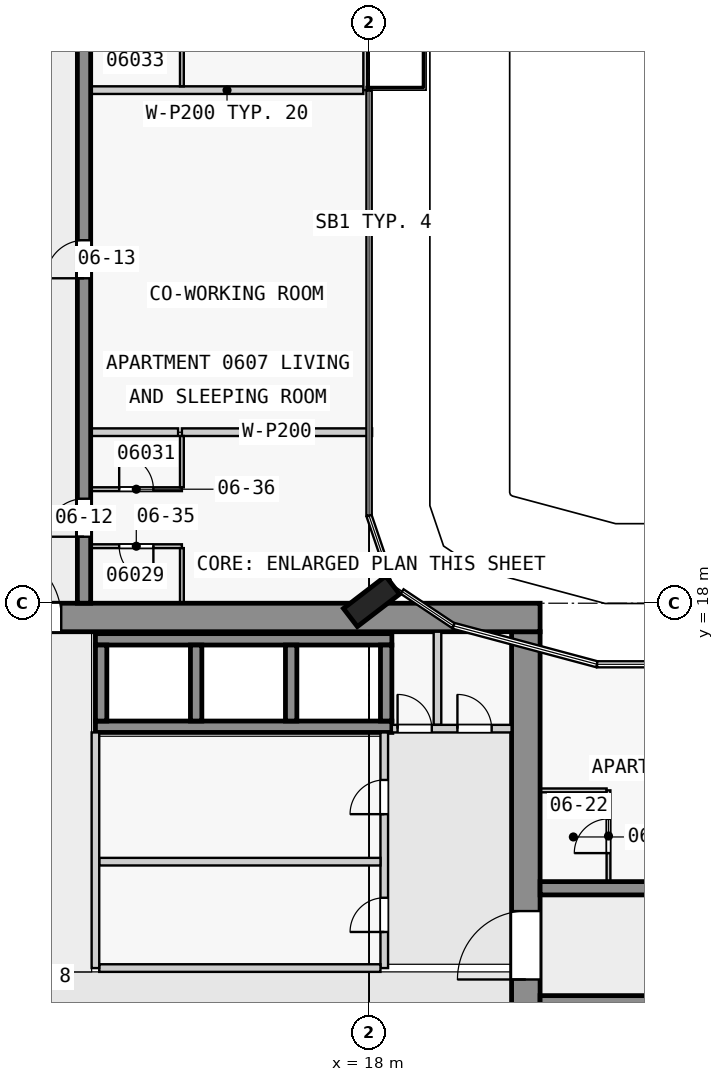
"""IFC4 building model, lengths in metres.
Left out: names, types, materials, properties, quantities, classifications, styles, units other than length and angle.
Written with IfcOpenShell. Run it as: python <this file> out.ifc"""

import sys

from ifc_helpers import new_model, si_unit, direction, frame, frame_2d, origin, origin_2d, place, context, subcontext, project, spatial, rectangle, hollow_rectangle, extrude, element, fill, save


model = new_model("IFC4")
c1 = context("Model", 3, precision=1e-05, world=origin(), true_north=direction((0.0, 1.0)))
c2 = subcontext(c1, "Body", "Model", "MODEL_VIEW")
j1 = project(units=[si_unit("LENGTHUNIT", "METRE"), si_unit("PLANEANGLEUNIT", "RADIAN")], contexts=[c1])
p1 = place(None, origin())
s1 = spatial("IfcSite", under=j1, at=p1, CompositionType="ELEMENT")
p2 = place(p1, origin())
s2 = spatial("IfcBuilding", under=s1, at=p2, CompositionType="ELEMENT")
p3 = place(p2, frame((0.0, 0.0, 30.3)))
s3 = spatial("IfcBuildingStorey", under=s2, at=p3, CompositionType="ELEMENT", Elevation=30.3)
p4 = place(p3, frame((18.065, 18.05, 0.0), z_axis=(0.0, 0.0, 1.0), x_axis=(-0.608810846443, 0.793315418515, 0.0)))
e1 = element("IfcColumn", 1, at=p4, inside=s3, PredefinedType="COLUMN", context=c2, shape_type="SweptSolid", body=[
    extrude(rectangle(XDim=0.6, YDim=1.4, at=origin_2d()), origin(), (0.0, 0.0, 1.0), 3.5),
])
p5 = place(p3, frame((1.55, 17.625, 0.0), z_axis=(0.0, 0.0, 1.0), x_axis=(1.0, 0.0, 0.0)))
e2 = element("IfcWall", 2, at=p5, inside=s3, PredefinedType="SHEAR", context=c2, shape_type="SweptSolid", body=[
    extrude(rectangle(XDim=20.95, YDim=0.75, at=frame_2d((10.475, 0.0))), origin(), (0.0, 0.0, 1.0), 3.25),
])
p6 = place(p5, frame((6.55, 0.0, 0.0)))
e3 = element("IfcOpeningElement", 3, at=p6, cuts=e2, PredefinedType="OPENING", context=c2, shape_type="SweptSolid", body=[
    extrude(rectangle(XDim=1.8, YDim=2.1, at=frame_2d((0.9, 1.05))), frame((0.0, 0.385, 0.0), z_axis=(0.0, -1.0, 0.0), x_axis=(1.0, 0.0, 0.0)), (0.0, 0.0, 1.0), 0.77),
])
p7 = place(p3, frame((22.125, 2.5, 0.0), z_axis=(0.0, 0.0, 1.0), x_axis=(0.0, 1.0, 0.0)))
e4 = element("IfcWall", 4, at=p7, inside=s3, PredefinedType="SHEAR", context=c2, shape_type="SweptSolid", body=[
    extrude(rectangle(XDim=14.75, YDim=0.75, at=frame_2d((7.375, 0.0))), origin(), (0.0, 0.0, 1.0), 3.25),
])
p8 = place(p7, frame((5.6, 0.0, 0.0)))
e5 = element("IfcOpeningElement", 5, at=p8, cuts=e4, PredefinedType="OPENING", context=c2, shape_type="SweptSolid", body=[
    extrude(rectangle(XDim=1.8, YDim=2.1, at=frame_2d((0.9, 1.05))), frame((0.0, 0.385, 0.0), z_axis=(0.0, -1.0, 0.0), x_axis=(1.0, 0.0, 0.0)), (0.0, 0.0, 1.0), 0.77),
])
for number, where, z_axis, x_axis in (
    (6, (10.8, 17.05, 0.0), (0.0, 0.0, 1.0), (1.0, 0.0, 0.0)),
    (7, (10.8, 14.75, 0.0), (0.0, 0.0, 1.0), (1.0, 0.0, 0.0)),
):
    element("IfcWall", number, at=place(p3, frame(where, z_axis=z_axis, x_axis=x_axis)), inside=s3, PredefinedType="SHEAR", context=c2, shape_type="SweptSolid", body=[
        extrude(rectangle(XDim=7.8, YDim=0.3, at=frame_2d((3.9, 0.0))), origin(), (0.0, 0.0, 1.0), 3.25),
    ])
for number, where, z_axis, x_axis in (
    (8, (10.95, 14.9, 0.0), (0.0, 0.0, 1.0), (0.0, 1.0, 0.0)),
    (9, (13.45, 14.9, 0.0), (0.0, 0.0, 1.0), (0.0, 1.0, 0.0)),
    (10, (15.95, 14.9, 0.0), (0.0, 0.0, 1.0), (0.0, 1.0, 0.0)),
    (11, (18.45, 14.9, 0.0), (0.0, 0.0, 1.0), (0.0, 1.0, 0.0)),
):
    element("IfcWall", number, at=place(p3, frame(where, z_axis=z_axis, x_axis=x_axis)), inside=s3, PredefinedType="SHEAR", context=c2, shape_type="SweptSolid", body=[
        extrude(rectangle(XDim=2.0, YDim=0.3, at=frame_2d((1.0, 0.0))), origin(), (0.0, 0.0, 1.0), 3.25),
    ])
p9 = place(p3, frame((22.5, 7.5, 0.0), z_axis=(0.0, 0.0, 1.0), x_axis=(1.0, 0.0, 0.0)))
e12 = element("IfcWall", 12, at=p9, inside=s3, PredefinedType="SHEAR", context=c2, shape_type="SweptSolid", body=[
    extrude(rectangle(XDim=22.5, YDim=0.35, at=frame_2d((11.25, 0.0))), origin(), (0.0, 0.0, 1.0), 3.25),
])
p10 = place(p9, frame((4.05, 0.0, 0.0)))
e13 = element("IfcOpeningElement", 13, at=p10, cuts=e12, PredefinedType="OPENING", context=c2, shape_type="SweptSolid", body=[
    extrude(rectangle(XDim=1.0, YDim=2.1, at=frame_2d((0.5, 1.05))), frame((0.0, 0.185, 0.0), z_axis=(0.0, -1.0, 0.0), x_axis=(1.0, 0.0, 0.0)), (0.0, 0.0, 1.0), 0.37),
])
p11 = place(p9, frame((10.75, 0.0, 0.0)))
e14 = element("IfcOpeningElement", 14, at=p11, cuts=e12, PredefinedType="OPENING", context=c2, shape_type="SweptSolid", body=[
    extrude(rectangle(XDim=1.0, YDim=2.1, at=frame_2d((0.5, 1.05))), frame((0.0, 0.185, 0.0), z_axis=(0.0, -1.0, 0.0), x_axis=(1.0, 0.0, 0.0)), (0.0, 0.0, 1.0), 0.37),
])
p12 = place(p9, frame((15.25, 0.0, 0.0)))
e15 = element("IfcOpeningElement", 15, at=p12, cuts=e12, PredefinedType="OPENING", context=c2, shape_type="SweptSolid", body=[
    extrude(rectangle(XDim=1.0, YDim=2.1, at=frame_2d((0.5, 1.05))), frame((0.0, 0.185, 0.0), z_axis=(0.0, -1.0, 0.0), x_axis=(1.0, 0.0, 0.0)), (0.0, 0.0, 1.0), 0.37),
])
p13 = place(p9, frame((18.75, 0.0, 0.0)))
e16 = element("IfcOpeningElement", 16, at=p13, cuts=e12, PredefinedType="OPENING", context=c2, shape_type="SweptSolid", body=[
    extrude(rectangle(XDim=0.9, YDim=2.1, at=frame_2d((0.45, 1.05))), frame((0.0, 0.185, 0.0), z_axis=(0.0, -1.0, 0.0), x_axis=(1.0, 0.0, 0.0)), (0.0, 0.0, 1.0), 0.37),
])
p14 = place(p9, frame((20.95, 0.0, 0.0)))
e17 = element("IfcOpeningElement", 17, at=p14, cuts=e12, PredefinedType="OPENING", context=c2, shape_type="SweptSolid", body=[
    extrude(rectangle(XDim=1.0, YDim=2.1, at=frame_2d((0.5, 1.05))), frame((0.0, 0.185, 0.0), z_axis=(0.0, -1.0, 0.0), x_axis=(1.0, 0.0, 0.0)), (0.0, 0.0, 1.0), 0.37),
])
p15 = place(p3, frame((22.5, 10.5, 0.0), z_axis=(0.0, 0.0, 1.0), x_axis=(1.0, 0.0, 0.0)))
e18 = element("IfcWall", 18, at=p15, inside=s3, PredefinedType="SHEAR", context=c2, shape_type="SweptSolid", body=[
    extrude(rectangle(XDim=22.5, YDim=0.35, at=frame_2d((11.25, 0.0))), origin(), (0.0, 0.0, 1.0), 3.25),
])
p16 = place(p15, frame((6.05, 0.0, 0.0)))
e19 = element("IfcOpeningElement", 19, at=p16, cuts=e18, PredefinedType="OPENING", context=c2, shape_type="SweptSolid", body=[
    extrude(rectangle(XDim=1.0, YDim=2.1, at=frame_2d((0.5, 1.05))), frame((0.0, 0.185, 0.0), z_axis=(0.0, -1.0, 0.0), x_axis=(1.0, 0.0, 0.0)), (0.0, 0.0, 1.0), 0.37),
])
p17 = place(p15, frame((15.25, 0.0, 0.0)))
e20 = element("IfcOpeningElement", 20, at=p17, cuts=e18, PredefinedType="OPENING", context=c2, shape_type="SweptSolid", body=[
    extrude(rectangle(XDim=1.0, YDim=2.1, at=frame_2d((0.5, 1.05))), frame((0.0, 0.185, 0.0), z_axis=(0.0, -1.0, 0.0), x_axis=(1.0, 0.0, 0.0)), (0.0, 0.0, 1.0), 0.37),
])
p18 = place(p15, frame((19.75, 0.0, 0.0)))
e21 = element("IfcOpeningElement", 21, at=p18, cuts=e18, PredefinedType="OPENING", context=c2, shape_type="SweptSolid", body=[
    extrude(rectangle(XDim=1.0, YDim=2.1, at=frame_2d((0.5, 1.05))), frame((0.0, 0.185, 0.0), z_axis=(0.0, -1.0, 0.0), x_axis=(1.0, 0.0, 0.0)), (0.0, 0.0, 1.0), 0.37),
])
p19 = place(p3, frame((10.5, 18.0, 0.0), z_axis=(0.0, 0.0, 1.0), x_axis=(0.0, 1.0, 0.0)))
e22 = element("IfcWall", 22, at=p19, inside=s3, PredefinedType="SHEAR", context=c2, shape_type="SweptSolid", body=[
    extrude(rectangle(XDim=27.0, YDim=0.35, at=frame_2d((13.5, 0.0))), origin(), (0.0, 0.0, 1.0), 3.25),
])
p20 = place(p19, frame((1.75, 0.0, 0.0)))
e23 = element("IfcOpeningElement", 23, at=p20, cuts=e22, PredefinedType="OPENING", context=c2, shape_type="SweptSolid", body=[
    extrude(rectangle(XDim=1.0, YDim=2.1, at=frame_2d((0.5, 1.05))), frame((0.0, 0.185, 0.0), z_axis=(0.0, -1.0, 0.0), x_axis=(1.0, 0.0, 0.0)), (0.0, 0.0, 1.0), 0.37),
])
p21 = place(p19, frame((8.55, 0.0, 0.0)))
e24 = element("IfcOpeningElement", 24, at=p21, cuts=e22, PredefinedType="OPENING", context=c2, shape_type="SweptSolid", body=[
    extrude(rectangle(XDim=1.0, YDim=2.1, at=frame_2d((0.5, 1.05))), frame((0.0, 0.185, 0.0), z_axis=(0.0, -1.0, 0.0), x_axis=(1.0, 0.0, 0.0)), (0.0, 0.0, 1.0), 0.37),
])
p22 = place(p19, frame((15.25, 0.0, 0.0)))
e25 = element("IfcOpeningElement", 25, at=p22, cuts=e22, PredefinedType="OPENING", context=c2, shape_type="SweptSolid", body=[
    extrude(rectangle(XDim=1.0, YDim=2.1, at=frame_2d((0.5, 1.05))), frame((0.0, 0.185, 0.0), z_axis=(0.0, -1.0, 0.0), x_axis=(1.0, 0.0, 0.0)), (0.0, 0.0, 1.0), 0.37),
])
p23 = place(p19, frame((19.75, 0.0, 0.0)))
e26 = element("IfcOpeningElement", 26, at=p23, cuts=e22, PredefinedType="OPENING", context=c2, shape_type="SweptSolid", body=[
    extrude(rectangle(XDim=1.0, YDim=2.1, at=frame_2d((0.5, 1.05))), frame((0.0, 0.185, 0.0), z_axis=(0.0, -1.0, 0.0), x_axis=(1.0, 0.0, 0.0)), (0.0, 0.0, 1.0), 0.37),
])
p24 = place(p19, frame((23.25, 0.0, 0.0)))
e27 = element("IfcOpeningElement", 27, at=p24, cuts=e22, PredefinedType="OPENING", context=c2, shape_type="SweptSolid", body=[
    extrude(rectangle(XDim=0.9, YDim=2.1, at=frame_2d((0.45, 1.05))), frame((0.0, 0.185, 0.0), z_axis=(0.0, -1.0, 0.0), x_axis=(1.0, 0.0, 0.0)), (0.0, 0.0, 1.0), 0.37),
])
p25 = place(p19, frame((25.45, 0.0, 0.0)))
e28 = element("IfcOpeningElement", 28, at=p25, cuts=e22, PredefinedType="OPENING", context=c2, shape_type="SweptSolid", body=[
    extrude(rectangle(XDim=1.0, YDim=2.1, at=frame_2d((0.5, 1.05))), frame((0.0, 0.185, 0.0), z_axis=(0.0, -1.0, 0.0), x_axis=(1.0, 0.0, 0.0)), (0.0, 0.0, 1.0), 0.37),
])
p26 = place(p3, frame((17.9, 36.0, 0.0), z_axis=(0.0, 0.0, 1.0), x_axis=(0.0, -1.0, 0.0)))
e29 = element("IfcWall", 29, at=p26, inside=s3, PredefinedType="STANDARD", context=c2, shape_type="SweptSolid", body=[
    extrude(rectangle(XDim=4.5, YDim=0.1, at=frame_2d((2.25, 0.0))), origin(), (0.0, 0.0, 1.0), 3.25),
])
p27 = place(p26, frame((1.05, 0.0, 0.0)))
e30 = element("IfcOpeningElement", 30, at=p27, cuts=e29, PredefinedType="OPENING", context=c2, shape_type="SweptSolid", body=[
    extrude(rectangle(XDim=2.4, YDim=2.4, at=frame_2d((1.2, 1.2))), frame((0.0, 0.06, 0.0), z_axis=(0.0, -1.0, 0.0), x_axis=(1.0, 0.0, 0.0)), (0.0, 0.0, 1.0), 0.12),
])
p28 = place(p3, frame((10.8, 8.4, 0.0), z_axis=(0.0, 0.0, 1.0), x_axis=(0.0, 1.0, 0.0)))
e31 = element("IfcWall", 31, at=p28, inside=s3, PredefinedType="PARTITIONING", context=c2, shape_type="SweptSolid", body=[
    extrude(rectangle(XDim=6.2, YDim=0.2, at=frame_2d((3.1, 0.0))), origin(), (0.0, 0.0, 1.0), 3.25),
])
p29 = place(p3, frame((10.9, 8.4, 0.0), z_axis=(0.0, 0.0, 1.0), x_axis=(1.0, 0.0, 0.0)))
e32 = element("IfcWall", 32, at=p29, inside=s3, PredefinedType="PARTITIONING", context=c2, shape_type="SweptSolid", body=[
    extrude(rectangle(XDim=7.4, YDim=0.2, at=frame_2d((3.7, 0.0))), origin(), (0.0, 0.0, 1.0), 3.25),
])
p30 = place(p3, frame((18.4, 8.4, 0.0), z_axis=(0.0, 0.0, 1.0), x_axis=(0.0, 1.0, 0.0)))
e33 = element("IfcWall", 33, at=p30, inside=s3, PredefinedType="PARTITIONING", context=c2, shape_type="SweptSolid", body=[
    extrude(rectangle(XDim=6.2, YDim=0.2, at=frame_2d((3.1, 0.0))), origin(), (0.0, 0.0, 1.0), 3.25),
])
p31 = place(p30, frame((0.95, 0.0, 0.0)))
e34 = element("IfcOpeningElement", 34, at=p31, cuts=e33, PredefinedType="OPENING", context=c2, shape_type="SweptSolid", body=[
    extrude(rectangle(XDim=0.9, YDim=2.1, at=frame_2d((0.45, 1.05))), frame((0.0, 0.11, 0.0), z_axis=(0.0, -1.0, 0.0), x_axis=(1.0, 0.0, 0.0)), (0.0, 0.0, 1.0), 0.22),
])
p32 = place(p30, frame((4.05, 0.0, 0.0)))
e35 = element("IfcOpeningElement", 35, at=p32, cuts=e33, PredefinedType="OPENING", context=c2, shape_type="SweptSolid", body=[
    extrude(rectangle(XDim=0.9, YDim=2.1, at=frame_2d((0.45, 1.05))), frame((0.0, 0.11, 0.0), z_axis=(0.0, -1.0, 0.0), x_axis=(1.0, 0.0, 0.0)), (0.0, 0.0, 1.0), 0.22),
])
p33 = place(p3, frame((10.9, 11.2, 0.0), z_axis=(0.0, 0.0, 1.0), x_axis=(1.0, 0.0, 0.0)))
e36 = element("IfcWall", 36, at=p33, inside=s3, PredefinedType="PARTITIONING", context=c2, shape_type="SweptSolid", body=[
    extrude(rectangle(XDim=7.4, YDim=0.2, at=frame_2d((3.7, 0.0))), origin(), (0.0, 0.0, 1.0), 3.25),
])
p34 = place(p3, frame((18.6, 14.7, 0.0), z_axis=(0.0, 0.0, 1.0), x_axis=(1.0, 0.0, 0.0)))
e37 = element("IfcWall", 37, at=p34, inside=s3, PredefinedType="PARTITIONING", context=c2, shape_type="SweptSolid", body=[
    extrude(rectangle(XDim=3.15, YDim=0.2, at=frame_2d((1.575, 0.0))), origin(), (0.0, 0.0, 1.0), 3.25),
])
p35 = place(p34, frame((0.15, 0.0, 0.0)))
e38 = element("IfcOpeningElement", 38, at=p35, cuts=e37, PredefinedType="OPENING", context=c2, shape_type="SweptSolid", body=[
    extrude(rectangle(XDim=0.9, YDim=2.1, at=frame_2d((0.45, 1.05))), frame((0.0, 0.11, 0.0), z_axis=(0.0, -1.0, 0.0), x_axis=(1.0, 0.0, 0.0)), (0.0, 0.0, 1.0), 0.22),
])
p36 = place(p34, frame((1.725, 0.0, 0.0)))
e39 = element("IfcOpeningElement", 39, at=p36, cuts=e37, PredefinedType="OPENING", context=c2, shape_type="SweptSolid", body=[
    extrude(rectangle(XDim=0.9, YDim=2.1, at=frame_2d((0.45, 1.05))), frame((0.0, 0.11, 0.0), z_axis=(0.0, -1.0, 0.0), x_axis=(1.0, 0.0, 0.0)), (0.0, 0.0, 1.0), 0.22),
])
p37 = place(p3, frame((19.8, 14.8, 0.0), z_axis=(0.0, 0.0, 1.0), x_axis=(0.0, 1.0, 0.0)))
e40 = element("IfcWall", 40, at=p37, inside=s3, PredefinedType="PARTITIONING", context=c2, shape_type="SweptSolid", body=[
    extrude(rectangle(XDim=2.45, YDim=0.2, at=frame_2d((1.225, 0.0))), origin(), (0.0, 0.0, 1.0), 3.25),
])
p38 = place(p3, frame((24.25, 13.075, 0.0), z_axis=(0.0, 0.0, 1.0), x_axis=(-1.0, 0.0, 0.0)))
e41 = element("IfcWall", 41, at=p38, inside=s3, PredefinedType="PARTITIONING", context=c2, shape_type="SweptSolid", body=[
    extrude(rectangle(XDim=1.75, YDim=0.1, at=frame_2d((0.875, 0.0))), origin(), (0.0, 0.0, 1.0), 3.25),
])
p39 = place(p3, frame((13.075, 19.5, 0.0), z_axis=(0.0, 0.0, 1.0), x_axis=(-1.0, 0.0, 0.0)))
e42 = element("IfcWall", 42, at=p39, inside=s3, PredefinedType="PARTITIONING", context=c2, shape_type="SweptSolid", body=[
    extrude(rectangle(XDim=2.4, YDim=0.1, at=frame_2d((1.2, 0.0))), origin(), (0.0, 0.0, 1.0), 3.25),
])
p40 = place(p39, frame((0.75, 0.0, 0.0)))
e43 = element("IfcOpeningElement", 43, at=p40, cuts=e42, PredefinedType="OPENING", context=c2, shape_type="SweptSolid", body=[
    extrude(rectangle(XDim=0.9, YDim=2.1, at=frame_2d((0.45, 1.05))), frame((0.0, 0.06, 0.0), z_axis=(0.0, -1.0, 0.0), x_axis=(1.0, 0.0, 0.0)), (0.0, 0.0, 1.0), 0.12),
])
p41 = place(p3, frame((10.675, 21.0, 0.0), z_axis=(0.0, 0.0, 1.0), x_axis=(1.0, 0.0, 0.0)))
e44 = element("IfcWall", 44, at=p41, inside=s3, PredefinedType="PARTITIONING", context=c2, shape_type="SweptSolid", body=[
    extrude(rectangle(XDim=2.4, YDim=0.1, at=frame_2d((1.2, 0.0))), origin(), (0.0, 0.0, 1.0), 3.25),
])
p42 = place(p41, frame((0.75, 0.0, 0.0)))
e45 = element("IfcOpeningElement", 45, at=p42, cuts=e44, PredefinedType="OPENING", context=c2, shape_type="SweptSolid", body=[
    extrude(rectangle(XDim=0.9, YDim=2.1, at=frame_2d((0.45, 1.05))), frame((0.0, 0.06, 0.0), z_axis=(0.0, -1.0, 0.0), x_axis=(1.0, 0.0, 0.0)), (0.0, 0.0, 1.0), 0.12),
])
p43 = place(p3, frame((12.975, 22.5, 0.0), z_axis=(0.0, 0.0, 1.0), x_axis=(-1.0, 0.0, 0.0)))
e46 = element("IfcWall", 46, at=p43, inside=s3, PredefinedType="PARTITIONING", context=c2, shape_type="SweptSolid", body=[
    extrude(rectangle(XDim=2.3, YDim=0.2, at=frame_2d((1.15, 0.0))), origin(), (0.0, 0.0, 1.0), 3.25),
])
p44 = place(p3, frame((13.075, 22.5, 0.0), z_axis=(0.0, 0.0, 1.0), x_axis=(1.0, 0.0, 0.0)))
e47 = element("IfcWall", 47, at=p44, inside=s3, PredefinedType="PARTITIONING", context=c2, shape_type="SweptSolid", body=[
    extrude(rectangle(XDim=5.005, YDim=0.2, at=frame_2d((2.502, 0.0))), origin(), (0.0, 0.0, 1.0), 3.25),
])
p45 = place(p3, frame((17.85, 31.5, 0.0), z_axis=(0.0, 0.0, 1.0), x_axis=(-1.0, 0.0, 0.0)))
e48 = element("IfcWall", 48, at=p45, inside=s3, PredefinedType="PARTITIONING", context=c2, shape_type="SweptSolid", body=[
    extrude(rectangle(XDim=7.175, YDim=0.2, at=frame_2d((3.587, 0.0))), origin(), (0.0, 0.0, 1.0), 3.25),
])
p46 = place(p3, frame((13.075, 18.0, 0.0), z_axis=(0.0, 0.0, 1.0), x_axis=(0.0, 1.0, 0.0)))
e49 = element("IfcWall", 49, at=p46, inside=s3, PredefinedType="PARTITIONING", context=c2, shape_type="SweptSolid", body=[
    extrude(rectangle(XDim=1.45, YDim=0.1, at=frame_2d((0.725, 0.0))), origin(), (0.0, 0.0, 1.0), 3.25),
])
for number, where, z_axis, x_axis in (
    (50, (13.075, 21.05, 0.0), (0.0, 0.0, 1.0), (0.0, 1.0, 0.0)),
    (51, (13.075, 31.6, 0.0), (0.0, 0.0, 1.0), (0.0, 1.0, 0.0)),
):
    element("IfcWall", number, at=place(p3, frame(where, z_axis=z_axis, x_axis=x_axis)), inside=s3, PredefinedType="PARTITIONING", context=c2, shape_type="SweptSolid", body=[
        extrude(rectangle(XDim=1.35, YDim=0.1, at=frame_2d((0.675, 0.0))), origin(), (0.0, 0.0, 1.0), 3.25),
    ])
p47 = place(p3, frame((24.3, 10.675, 0.0), z_axis=(0.0, 0.0, 1.0), x_axis=(0.0, 1.0, 0.0)))
e52 = element("IfcWall", 52, at=p47, inside=s3, PredefinedType="PARTITIONING", context=c2, shape_type="SweptSolid", body=[
    extrude(rectangle(XDim=2.4, YDim=0.1, at=frame_2d((1.2, 0.0))), origin(), (0.0, 0.0, 1.0), 3.25),
])
p48 = place(p47, frame((0.75, 0.0, 0.0)))
e53 = element("IfcOpeningElement", 53, at=p48, cuts=e52, PredefinedType="OPENING", context=c2, shape_type="SweptSolid", body=[
    extrude(rectangle(XDim=0.9, YDim=2.1, at=frame_2d((0.45, 1.05))), frame((0.0, 0.06, 0.0), z_axis=(0.0, -1.0, 0.0), x_axis=(1.0, 0.0, 0.0)), (0.0, 0.0, 1.0), 0.12),
])
p49 = place(p2, frame((0.0, 0.0, 26.8)))
s4 = spatial("IfcBuildingStorey", under=s2, at=p49, CompositionType="ELEMENT", Elevation=26.8)
for number, where, z_axis, x_axis in (
    (54, (21.281, 26.754, 0.45), (0.0, 0.0, 1.0), (1.0, 0.0, 0.0)),
    (55, (21.301, 20.533, 0.45), (0.0, 0.0, 1.0), (1.0, 0.0, 0.0)),
    (56, (24.421, 19.593, 0.45), (0.0, 0.0, 1.0), (1.0, 0.0, 0.0)),
):
    element("IfcColumn", number, at=place(p49, frame(where, z_axis=z_axis, x_axis=x_axis)), inside=s4, PredefinedType="COLUMN", context=c2, shape_type="SweptSolid", body=[
        extrude(hollow_rectangle(XDim=0.5, YDim=0.5, WallThickness=0.025, InnerFilletRadius=0.025, OuterFilletRadius=0.05, at=origin_2d()), origin(), (0.0, 0.0, 1.0), 5.85),
    ])
p50 = place(p31, origin())
e57 = element("IfcDoor", 57, at=p50, inside=s3, OperationType="SINGLE_SWING_LEFT", PredefinedType="DOOR", context=c2, shape_type="SweptSolid", body=[
    extrude(rectangle(XDim=0.9, YDim=2.1, at=frame_2d((0.45, 1.05))), frame((0.0, 0.025, 0.0), z_axis=(0.0, -1.0, 0.0), x_axis=(1.0, 0.0, 0.0)), (0.0, 0.0, 1.0), 0.05),
])
fill(e34, e57)
p51 = place(p32, origin())
e58 = element("IfcDoor", 58, at=p51, inside=s3, OperationType="SINGLE_SWING_LEFT", PredefinedType="DOOR", context=c2, shape_type="SweptSolid", body=[
    extrude(rectangle(XDim=0.9, YDim=2.1, at=frame_2d((0.45, 1.05))), frame((0.0, 0.025, 0.0), z_axis=(0.0, -1.0, 0.0), x_axis=(1.0, 0.0, 0.0)), (0.0, 0.0, 1.0), 0.05),
])
fill(e35, e58)
p52 = place(p8, origin())
e59 = element("IfcDoor", 59, at=p52, inside=s3, OperationType="DOUBLE_DOOR_SINGLE_SWING", PredefinedType="DOOR", context=c2, shape_type="SweptSolid", body=[
    extrude(rectangle(XDim=1.8, YDim=2.1, at=frame_2d((0.9, 1.05))), frame((0.0, 0.025, 0.0), z_axis=(0.0, -1.0, 0.0), x_axis=(1.0, 0.0, 0.0)), (0.0, 0.0, 1.0), 0.05),
])
fill(e5, e59)
p53 = place(p6, origin())
e60 = element("IfcDoor", 60, at=p53, inside=s3, OperationType="DOUBLE_DOOR_SINGLE_SWING", PredefinedType="DOOR", context=c2, shape_type="SweptSolid", body=[
    extrude(rectangle(XDim=1.8, YDim=2.1, at=frame_2d((0.9, 1.05))), frame((0.0, 0.025, 0.0), z_axis=(0.0, -1.0, 0.0), x_axis=(1.0, 0.0, 0.0)), (0.0, 0.0, 1.0), 0.05),
])
fill(e3, e60)
p54 = place(p35, origin())
e61 = element("IfcDoor", 61, at=p54, inside=s3, OperationType="SINGLE_SWING_LEFT", PredefinedType="DOOR", context=c2, shape_type="SweptSolid", body=[
    extrude(rectangle(XDim=0.9, YDim=2.1, at=frame_2d((0.45, 1.05))), frame((0.0, 0.025, 0.0), z_axis=(0.0, -1.0, 0.0), x_axis=(1.0, 0.0, 0.0)), (0.0, 0.0, 1.0), 0.05),
])
fill(e38, e61)
p55 = place(p36, origin())
e62 = element("IfcDoor", 62, at=p55, inside=s3, OperationType="SINGLE_SWING_LEFT", PredefinedType="DOOR", context=c2, shape_type="SweptSolid", body=[
    extrude(rectangle(XDim=0.9, YDim=2.1, at=frame_2d((0.45, 1.05))), frame((0.0, 0.025, 0.0), z_axis=(0.0, -1.0, 0.0), x_axis=(1.0, 0.0, 0.0)), (0.0, 0.0, 1.0), 0.05),
])
fill(e39, e62)
p56 = place(p20, origin())
e63 = element("IfcDoor", 63, at=p56, inside=s3, OperationType="SINGLE_SWING_LEFT", PredefinedType="DOOR", context=c2, shape_type="SweptSolid", body=[
    extrude(rectangle(XDim=1.0, YDim=2.1, at=frame_2d((0.5, 1.05))), frame((0.0, 0.025, 0.0), z_axis=(0.0, -1.0, 0.0), x_axis=(1.0, 0.0, 0.0)), (0.0, 0.0, 1.0), 0.05),
])
fill(e23, e63)
p57 = place(p21, origin())
e64 = element("IfcDoor", 64, at=p57, inside=s3, OperationType="SINGLE_SWING_LEFT", PredefinedType="DOOR", context=c2, shape_type="SweptSolid", body=[
    extrude(rectangle(XDim=1.0, YDim=2.1, at=frame_2d((0.5, 1.05))), frame((0.0, 0.025, 0.0), z_axis=(0.0, -1.0, 0.0), x_axis=(1.0, 0.0, 0.0)), (0.0, 0.0, 1.0), 0.05),
])
fill(e24, e64)
p58 = place(p48, origin())
e65 = element("IfcDoor", 65, at=p58, inside=s3, OperationType="SINGLE_SWING_RIGHT", PredefinedType="DOOR", context=c2, shape_type="SweptSolid", body=[
    extrude(rectangle(XDim=0.9, YDim=2.1, at=frame_2d((0.45, 1.05))), frame((0.0, 0.025, 0.0), z_axis=(0.0, -1.0, 0.0), x_axis=(1.0, 0.0, 0.0)), (0.0, 0.0, 1.0), 0.05),
])
fill(e53, e65)
p59 = place(p40, origin())
e66 = element("IfcDoor", 66, at=p59, inside=s3, OperationType="SINGLE_SWING_RIGHT", PredefinedType="DOOR", context=c2, shape_type="SweptSolid", body=[
    extrude(rectangle(XDim=0.9, YDim=2.1, at=frame_2d((0.45, 1.05))), frame((0.0, 0.025, 0.0), z_axis=(0.0, -1.0, 0.0), x_axis=(1.0, 0.0, 0.0)), (0.0, 0.0, 1.0), 0.05),
])
fill(e43, e66)
p60 = place(p42, origin())
e67 = element("IfcDoor", 67, at=p60, inside=s3, OperationType="SINGLE_SWING_RIGHT", PredefinedType="DOOR", context=c2, shape_type="SweptSolid", body=[
    extrude(rectangle(XDim=0.9, YDim=2.1, at=frame_2d((0.45, 1.05))), frame((0.0, 0.025, 0.0), z_axis=(0.0, -1.0, 0.0), x_axis=(1.0, 0.0, 0.0)), (0.0, 0.0, 1.0), 0.05),
])
fill(e45, e67)
save(model, sys.argv[1])
